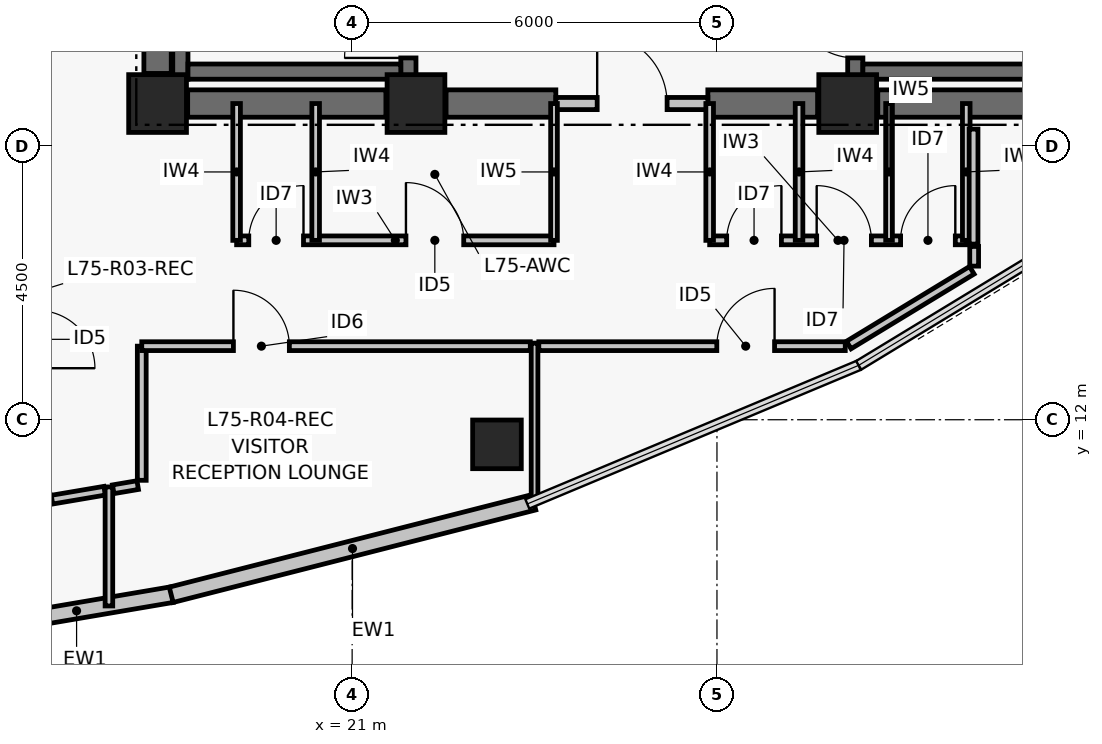
"""IFC4 building model, lengths in metres.
Left out: names, types, materials, properties, quantities, classifications, styles, units other than length and angle.
Written with IfcOpenShell. Run it as: python <this file> out.ifc"""

import sys

from ifc_helpers import new_model, si_unit, direction, frame, frame_2d, origin, origin_2d, place, context, subcontext, project, spatial, rectangle, hollow_rectangle, extrude, element, fill, save


model = new_model("IFC4")
c1 = context("Model", 3, precision=1e-05, world=origin(), true_north=direction((0.0, 1.0)))
c2 = subcontext(c1, "Body", "Model", "MODEL_VIEW")
j1 = project(units=[si_unit("LENGTHUNIT", "METRE"), si_unit("PLANEANGLEUNIT", "RADIAN")], contexts=[c1])
p1 = place(None, origin())
s1 = spatial("IfcSite", under=j1, at=p1, CompositionType="ELEMENT")
p2 = place(p1, origin())
s2 = spatial("IfcBuilding", under=s1, at=p2, CompositionType="ELEMENT")
p3 = place(p2, frame((0.0, 0.0, 295.5)))
s3 = spatial("IfcBuildingStorey", under=s2, at=p3, CompositionType="ELEMENT", Elevation=295.5)
for number, where, z_axis, x_axis in (
    (1, (17.8, 17.2, 0.0), (0.0, 0.0, 1.0), (1.0, 0.0, 0.0)),
    (2, (22.05, 17.2, 0.0), (0.0, 0.0, 1.0), (1.0, 0.0, 0.0)),
    (3, (29.15, 17.2, 0.0), (0.0, 0.0, 1.0), (1.0, 0.0, 0.0)),
):
    element("IfcColumn", number, at=place(p3, frame(where, z_axis=z_axis, x_axis=x_axis)), inside=s3, PredefinedType="COLUMN", context=c2, shape_type="SweptSolid", body=[
        extrude(rectangle(XDim=0.95, YDim=0.95, at=origin_2d()), origin(), (0.0, 0.0, 1.0), 3.72),
    ])
p4 = place(p3, frame((18.295, 17.2, 0.0), z_axis=(0.0, 0.0, 1.0), x_axis=(1.0, 0.0, 0.0)))
e4 = element("IfcWall", 4, at=p4, inside=s3, PredefinedType="SHEAR", context=c2, shape_type="SweptSolid", body=[
    extrude(rectangle(XDim=3.26, YDim=0.45, at=frame_2d((1.63, 0.0))), origin(), (0.0, 0.0, 1.0), 3.44),
])
p5 = place(p3, frame((22.545, 17.2, 0.0), z_axis=(0.0, 0.0, 1.0), x_axis=(1.0, 0.0, 0.0)))
e5 = element("IfcWall", 5, at=p5, inside=s3, PredefinedType="SHEAR", context=c2, shape_type="SweptSolid", body=[
    extrude(rectangle(XDim=1.805, YDim=0.45, at=frame_2d((0.903, 0.0))), origin(), (0.0, 0.0, 1.0), 3.44),
])
p6 = place(p3, frame((26.85, 17.2, 0.0), z_axis=(0.0, 0.0, 1.0), x_axis=(1.0, 0.0, 0.0)))
e6 = element("IfcWall", 6, at=p6, inside=s3, PredefinedType="SHEAR", context=c2, shape_type="SweptSolid", body=[
    extrude(rectangle(XDim=1.805, YDim=0.45, at=frame_2d((0.902, 0.0))), origin(), (0.0, 0.0, 1.0), 3.44),
])
p7 = place(p3, frame((29.645, 17.2, 0.0), z_axis=(0.0, 0.0, 1.0), x_axis=(1.0, 0.0, 0.0)))
e7 = element("IfcWall", 7, at=p7, inside=s3, PredefinedType="SHEAR", context=c2, shape_type="SweptSolid", body=[
    extrude(rectangle(XDim=3.26, YDim=0.45, at=frame_2d((1.63, 0.0))), origin(), (0.0, 0.0, 1.0), 3.44),
])
p8 = place(p3, frame((17.8, 17.695, 0.0), z_axis=(0.0, 0.0, 1.0), x_axis=(0.0, 1.0, 0.0)))
e8 = element("IfcWall", 8, at=p8, inside=s3, PredefinedType="SHEAR", context=c2, shape_type="SweptSolid", body=[
    extrude(rectangle(XDim=8.61, YDim=0.45, at=frame_2d((4.305, 0.0))), origin(), (0.0, 0.0, 1.0), 3.44),
])
p9 = place(p3, frame((18.175, 17.6, 0.0), z_axis=(0.0, 0.0, 1.0), x_axis=(0.0, 1.0, 0.0)))
e9 = element("IfcWall", 9, at=p9, inside=s3, PredefinedType="SHEAR", context=c2, shape_type="SweptSolid", body=[
    extrude(rectangle(XDim=8.8, YDim=0.25, at=frame_2d((4.4, 0.0))), origin(), (0.0, 0.0, 1.0), 3.44),
])
p10 = place(p3, frame((21.925, 17.6, 0.0), z_axis=(0.0, 0.0, 1.0), x_axis=(0.0, 1.0, 0.0)))
e10 = element("IfcWall", 10, at=p10, inside=s3, PredefinedType="SHEAR", context=c2, shape_type="SweptSolid", body=[
    extrude(rectangle(XDim=8.8, YDim=0.25, at=frame_2d((4.4, 0.0))), origin(), (0.0, 0.0, 1.0), 3.44),
])
p11 = place(p10, frame((0.35, 0.0, 0.0)))
e11 = element("IfcOpeningElement", 11, at=p11, cuts=e10, PredefinedType="OPENING", context=c2, shape_type="SweptSolid", body=[
    extrude(rectangle(XDim=1.05, YDim=2.08, at=frame_2d((0.525, 1.04))), frame((0.0, 0.135, 0.0), z_axis=(0.0, -1.0, 0.0), x_axis=(1.0, 0.0, 0.0)), (0.0, 0.0, 1.0), 0.27),
])
p12 = place(p3, frame((18.3, 17.725, 0.0), z_axis=(0.0, 0.0, 1.0), x_axis=(1.0, 0.0, 0.0)))
e12 = element("IfcWall", 12, at=p12, inside=s3, PredefinedType="SHEAR", context=c2, shape_type="SweptSolid", body=[
    extrude(rectangle(XDim=3.5, YDim=0.25, at=frame_2d((1.75, 0.0))), origin(), (0.0, 0.0, 1.0), 3.44),
])
p13 = place(p3, frame((29.275, 17.6, 0.0), z_axis=(0.0, 0.0, 1.0), x_axis=(0.0, 1.0, 0.0)))
e13 = element("IfcWall", 13, at=p13, inside=s3, PredefinedType="SHEAR", context=c2, shape_type="SweptSolid", body=[
    extrude(rectangle(XDim=8.8, YDim=0.25, at=frame_2d((4.4, 0.0))), origin(), (0.0, 0.0, 1.0), 3.44),
])
p14 = place(p13, frame((0.35, 0.0, 0.0)))
e14 = element("IfcOpeningElement", 14, at=p14, cuts=e13, PredefinedType="OPENING", context=c2, shape_type="SweptSolid", body=[
    extrude(rectangle(XDim=1.05, YDim=2.08, at=frame_2d((0.525, 1.04))), frame((0.0, 0.135, 0.0), z_axis=(0.0, -1.0, 0.0), x_axis=(1.0, 0.0, 0.0)), (0.0, 0.0, 1.0), 0.27),
])
p15 = place(p3, frame((29.4, 17.725, 0.0), z_axis=(0.0, 0.0, 1.0), x_axis=(1.0, 0.0, 0.0)))
e15 = element("IfcWall", 15, at=p15, inside=s3, PredefinedType="SHEAR", context=c2, shape_type="SweptSolid", body=[
    extrude(rectangle(XDim=3.5, YDim=0.25, at=frame_2d((1.75, 0.0))), origin(), (0.0, 0.0, 1.0), 3.44),
])
p16 = place(p3, frame((23.382, 11.595, 0.0), z_axis=(0.0, 0.0, 1.0), x_axis=(1.0, 0.0, 0.0)))
e16 = element("IfcColumn", 16, at=p16, inside=s3, PredefinedType="COLUMN", context=c2, shape_type="SweptSolid", body=[
    extrude(hollow_rectangle(XDim=0.8, YDim=0.8, WallThickness=0.035, at=origin_2d()), origin(), (0.0, 0.0, 1.0), 3.72),
])
p17 = place(p3, frame((18.036, 9.124, 0.0), z_axis=(0.0, 0.0, 1.0), x_axis=(-0.985889432766, -0.167397808709, 0.0)))
e17 = element("IfcWall", 17, at=p17, inside=s3, PredefinedType="PARTITIONING", context=c2, shape_type="SweptSolid", body=[
    extrude(rectangle(XDim=3.181, YDim=0.26, at=frame_2d((1.59, 0.0))), origin(), (0.0, 0.0, 1.0), 3.44),
])
p18 = place(p3, frame((23.988, 10.642, 0.0), z_axis=(0.0, 0.0, 1.0), x_axis=(-0.968988278672, -0.247106689096, 0.0)))
e18 = element("IfcWall", 18, at=p18, inside=s3, PredefinedType="PARTITIONING", context=c2, shape_type="SweptSolid", body=[
    extrude(rectangle(XDim=6.154, YDim=0.26, at=frame_2d((3.077, 0.0))), origin(), (0.0, 0.0, 1.0), 3.44),
])
p19 = place(p3, frame((24.35, 17.2, 0.0), z_axis=(0.0, 0.0, 1.0), x_axis=(1.0, 0.0, 0.0)))
e19 = element("IfcWall", 19, at=p19, inside=s3, PredefinedType="PARTITIONING", context=c2, shape_type="SweptSolid", body=[
    extrude(rectangle(XDim=2.5, YDim=0.2, at=frame_2d((1.25, 0.0))), origin(), (0.0, 0.0, 1.0), 2.57),
])
p20 = place(p19, frame((0.68, 0.0, 0.0)))
e20 = element("IfcOpeningElement", 20, at=p20, cuts=e19, PredefinedType="OPENING", context=c2, shape_type="SweptSolid", body=[
    extrude(rectangle(XDim=1.15, YDim=2.08, at=frame_2d((0.575, 1.04))), frame((0.0, 0.11, 0.0), z_axis=(0.0, -1.0, 0.0), x_axis=(1.0, 0.0, 0.0)), (0.0, 0.0, 1.0), 0.22),
])
p21 = place(p3, frame((19.1, 14.95, 0.0), z_axis=(0.0, 0.0, 1.0), x_axis=(1.0, 0.0, 0.0)))
e21 = element("IfcWall", 21, at=p21, inside=s3, PredefinedType="PARTITIONING", context=c2, shape_type="SweptSolid", body=[
    extrude(rectangle(XDim=5.22, YDim=0.145, at=frame_2d((2.61, 0.0))), origin(), (0.0, 0.0, 1.0), 2.17),
])
p22 = place(p21, frame((0.2, 0.0, 0.0)))
e22 = element("IfcOpeningElement", 22, at=p22, cuts=e21, PredefinedType="OPENING", context=c2, shape_type="SweptSolid", body=[
    extrude(rectangle(XDim=0.9, YDim=2.02, at=frame_2d((0.45, 1.01))), frame((0.0, 0.083, 0.0), z_axis=(0.0, -1.0, 0.0), x_axis=(1.0, 0.0, 0.0)), (0.0, 0.0, 1.0), 0.165),
])
p23 = place(p21, frame((2.785, 0.0, 0.0)))
e23 = element("IfcOpeningElement", 23, at=p23, cuts=e21, PredefinedType="OPENING", context=c2, shape_type="SweptSolid", body=[
    extrude(rectangle(XDim=0.95, YDim=2.06, at=frame_2d((0.475, 1.03))), frame((0.0, 0.083, 0.0), z_axis=(0.0, -1.0, 0.0), x_axis=(1.0, 0.0, 0.0)), (0.0, 0.0, 1.0), 0.165),
])
p24 = place(p3, frame((26.88, 14.95, 0.0), z_axis=(0.0, 0.0, 1.0), x_axis=(1.0, 0.0, 0.0)))
e24 = element("IfcWall", 24, at=p24, inside=s3, PredefinedType="PARTITIONING", context=c2, shape_type="SweptSolid", body=[
    extrude(rectangle(XDim=4.22, YDim=0.145, at=frame_2d((2.11, 0.0))), origin(), (0.0, 0.0, 1.0), 2.92),
])
p25 = place(p24, frame((0.28, 0.0, 0.0)))
e25 = element("IfcOpeningElement", 25, at=p25, cuts=e24, PredefinedType="OPENING", context=c2, shape_type="SweptSolid", body=[
    extrude(rectangle(XDim=0.9, YDim=2.02, at=frame_2d((0.45, 1.01))), frame((0.0, 0.083, 0.0), z_axis=(0.0, -1.0, 0.0), x_axis=(1.0, 0.0, 0.0)), (0.0, 0.0, 1.0), 0.165),
])
p26 = place(p24, frame((1.76, 0.0, 0.0)))
e26 = element("IfcOpeningElement", 26, at=p26, cuts=e24, PredefinedType="OPENING", context=c2, shape_type="SweptSolid", body=[
    extrude(rectangle(XDim=0.9, YDim=2.02, at=frame_2d((0.45, 1.01))), frame((0.0, 0.083, 0.0), z_axis=(0.0, -1.0, 0.0), x_axis=(1.0, 0.0, 0.0)), (0.0, 0.0, 1.0), 0.165),
])
p27 = place(p24, frame((3.14, 0.0, 0.0)))
e27 = element("IfcOpeningElement", 27, at=p27, cuts=e24, PredefinedType="OPENING", context=c2, shape_type="SweptSolid", body=[
    extrude(rectangle(XDim=0.9, YDim=2.02, at=frame_2d((0.45, 1.01))), frame((0.0, 0.083, 0.0), z_axis=(0.0, -1.0, 0.0), x_axis=(1.0, 0.0, 0.0)), (0.0, 0.0, 1.0), 0.165),
])
for number, where, z_axis, x_axis in (
    (28, (19.1, 14.95, 0.0), (0.0, 0.0, 1.0), (0.0, 1.0, 0.0)),
    (29, (20.4, 14.95, 0.0), (0.0, 0.0, 1.0), (0.0, 1.0, 0.0)),
):
    element("IfcWall", number, at=place(p3, frame(where, z_axis=z_axis, x_axis=x_axis)), inside=s3, PredefinedType="PARTITIONING", context=c2, shape_type="SweptSolid", body=[
        extrude(rectangle(XDim=2.25, YDim=0.125, at=frame_2d((1.125, 0.0))), origin(), (0.0, 0.0, 1.0), 2.57),
    ])
p28 = place(p3, frame((24.32, 14.95, 0.0), z_axis=(0.0, 0.0, 1.0), x_axis=(0.0, 1.0, 0.0)))
e30 = element("IfcWall", 30, at=p28, inside=s3, PredefinedType="PARTITIONING", context=c2, shape_type="SweptSolid", body=[
    extrude(rectangle(XDim=2.25, YDim=0.11, at=frame_2d((1.125, 0.0))), origin(), (0.0, 0.0, 1.0), 2.57),
])
for number, where, z_axis, x_axis in (
    (31, (26.88, 14.95, 0.0), (0.0, 0.0, 1.0), (0.0, 1.0, 0.0)),
    (32, (28.35, 14.95, 0.0), (0.0, 0.0, 1.0), (0.0, 1.0, 0.0)),
):
    element("IfcWall", number, at=place(p3, frame(where, z_axis=z_axis, x_axis=x_axis)), inside=s3, PredefinedType="PARTITIONING", context=c2, shape_type="SweptSolid", body=[
        extrude(rectangle(XDim=2.25, YDim=0.125, at=frame_2d((1.125, 0.0))), origin(), (0.0, 0.0, 1.0), 2.57),
    ])
p29 = place(p3, frame((29.83, 14.95, 0.0), z_axis=(0.0, 0.0, 1.0), x_axis=(0.0, 1.0, 0.0)))
e33 = element("IfcWall", 33, at=p29, inside=s3, PredefinedType="PARTITIONING", context=c2, shape_type="SweptSolid", body=[
    extrude(rectangle(XDim=2.25, YDim=0.11, at=frame_2d((1.125, 0.0))), origin(), (0.0, 0.0, 1.0), 2.57),
])
p30 = place(p3, frame((31.1, 14.95, 0.0), z_axis=(0.0, 0.0, 1.0), x_axis=(0.0, 1.0, 0.0)))
e34 = element("IfcWall", 34, at=p30, inside=s3, PredefinedType="PARTITIONING", context=c2, shape_type="SweptSolid", body=[
    extrude(rectangle(XDim=2.25, YDim=0.125, at=frame_2d((1.125, 0.0))), origin(), (0.0, 0.0, 1.0), 2.57),
])
p31 = place(p3, frame((16.063, 10.686, 0.0), z_axis=(0.0, 0.0, 1.0), x_axis=(0.985878779942, 0.167460536424, 0.0)))
e35 = element("IfcWall", 35, at=p31, inside=s3, PredefinedType="PARTITIONING", context=c2, shape_type="SweptSolid", body=[
    extrude(rectangle(XDim=0.879, YDim=0.145, at=frame_2d((0.439, 0.0))), origin(), (0.0, 0.0, 1.0), 2.17),
])
p32 = place(p3, frame((17.07, 10.856, 0.0), z_axis=(0.0, 0.0, 1.0), x_axis=(0.985840066474, 0.167688292179, 0.0)))
e36 = element("IfcWall", 36, at=p32, inside=s3, PredefinedType="PARTITIONING", context=c2, shape_type="SweptSolid", body=[
    extrude(rectangle(XDim=0.409, YDim=0.145, at=frame_2d((0.205, 0.0))), origin(), (0.0, 0.0, 1.0), 3.44),
])
p33 = place(p3, frame((17.54, 11.004, 0.0), z_axis=(0.0, 0.0, 1.0), x_axis=(0.0, 1.0, 0.0)))
e37 = element("IfcWall", 37, at=p33, inside=s3, PredefinedType="PARTITIONING", context=c2, shape_type="SweptSolid", body=[
    extrude(rectangle(XDim=2.206, YDim=0.145, at=frame_2d((1.103, 0.0))), origin(), (0.0, 0.0, 1.0), 3.44),
])
p34 = place(p3, frame((17.54, 13.21, 0.0), z_axis=(0.0, 0.0, 1.0), x_axis=(1.0, 0.0, 0.0)))
e38 = element("IfcWall", 38, at=p34, inside=s3, PredefinedType="PARTITIONING", context=c2, shape_type="SweptSolid", body=[
    extrude(rectangle(XDim=6.39, YDim=0.145, at=frame_2d((3.195, 0.0))), origin(), (0.0, 0.0, 1.0), 2.17),
])
p35 = place(p34, frame((1.508, 0.0, 0.0)))
e39 = element("IfcOpeningElement", 39, at=p35, cuts=e38, PredefinedType="OPENING", context=c2, shape_type="SweptSolid", body=[
    extrude(rectangle(XDim=0.92, YDim=2.05, at=frame_2d((0.46, 1.025))), frame((0.0, 0.083, 0.0), z_axis=(0.0, -1.0, 0.0), x_axis=(1.0, 0.0, 0.0)), (0.0, 0.0, 1.0), 0.165),
])
p36 = place(p3, frame((24.07, 13.21, 0.0), z_axis=(0.0, 0.0, 1.0), x_axis=(1.0, 0.0, 0.0)))
e40 = element("IfcWall", 40, at=p36, inside=s3, PredefinedType="PARTITIONING", context=c2, shape_type="SweptSolid", body=[
    extrude(rectangle(XDim=5.04, YDim=0.145, at=frame_2d((2.52, 0.0))), origin(), (0.0, 0.0, 1.0), 2.92),
])
p37 = place(p36, frame((2.927, 0.0, 0.0)))
e41 = element("IfcOpeningElement", 41, at=p37, cuts=e40, PredefinedType="OPENING", context=c2, shape_type="SweptSolid", body=[
    extrude(rectangle(XDim=0.95, YDim=2.06, at=frame_2d((0.475, 1.03))), frame((0.0, 0.083, 0.0), z_axis=(0.0, -1.0, 0.0), x_axis=(1.0, 0.0, 0.0)), (0.0, 0.0, 1.0), 0.165),
])
p38 = place(p3, frame((29.168, 13.229, 0.0), z_axis=(0.0, 0.0, 1.0), x_axis=(0.854678044033, 0.519158396876, 0.0)))
e42 = element("IfcWall", 42, at=p38, inside=s3, PredefinedType="PARTITIONING", context=c2, shape_type="SweptSolid", body=[
    extrude(rectangle(XDim=2.368, YDim=0.145, at=frame_2d((1.184, 0.0))), origin(), (0.0, 0.0, 1.0), 3.44),
])
p39 = place(p3, frame((31.23, 14.526, 0.0), z_axis=(0.0, 0.0, 1.0), x_axis=(0.0, 1.0, 0.0)))
e43 = element("IfcWall", 43, at=p39, inside=s3, PredefinedType="PARTITIONING", context=c2, shape_type="SweptSolid", body=[
    extrude(rectangle(XDim=0.324, YDim=0.145, at=frame_2d((0.162, 0.0))), origin(), (0.0, 0.0, 1.0), 3.44),
])
p40 = place(p3, frame((31.22, 14.889, 0.0), z_axis=(0.0, 0.0, 1.0), x_axis=(0.0, 1.0, 0.0)))
e44 = element("IfcWall", 44, at=p40, inside=s3, PredefinedType="PARTITIONING", context=c2, shape_type="SweptSolid", body=[
    extrude(rectangle(XDim=1.891, YDim=0.145, at=frame_2d((0.946, 0.0))), origin(), (0.0, 0.0, 1.0), 2.57),
])
p41 = place(p3, frame((17.0, 8.938, 0.0), z_axis=(0.0, 0.0, 1.0), x_axis=(0.0, 1.0, 0.0)))
e45 = element("IfcWall", 45, at=p41, inside=s3, PredefinedType="PARTITIONING", context=c2, shape_type="SweptSolid", body=[
    extrude(rectangle(XDim=1.958, YDim=0.125, at=frame_2d((0.979, 0.0))), origin(), (0.0, 0.0, 1.0), 2.92),
])
p42 = place(p3, frame((24.0, 10.654, 0.0), z_axis=(0.0, 0.0, 1.0), x_axis=(0.0, 1.0, 0.0)))
e46 = element("IfcWall", 46, at=p42, inside=s3, PredefinedType="PARTITIONING", context=c2, shape_type="SweptSolid", body=[
    extrude(rectangle(XDim=2.606, YDim=0.11, at=frame_2d((1.303, 0.0))), origin(), (0.0, 0.0, 1.0), 2.92),
])
p43 = place(p11, origin())
e47 = element("IfcDoor", 47, at=p43, inside=s3, OperationType="SINGLE_SWING_LEFT", PredefinedType="DOOR", context=c2, shape_type="SweptSolid", body=[
    extrude(rectangle(XDim=1.05, YDim=2.08, at=frame_2d((0.525, 1.04))), frame((0.0, 0.025, 0.0), z_axis=(0.0, -1.0, 0.0), x_axis=(1.0, 0.0, 0.0)), (0.0, 0.0, 1.0), 0.05),
])
fill(e11, e47)
p44 = place(p14, origin())
e48 = element("IfcDoor", 48, at=p44, inside=s3, OperationType="SINGLE_SWING_RIGHT", PredefinedType="DOOR", context=c2, shape_type="SweptSolid", body=[
    extrude(rectangle(XDim=1.05, YDim=2.08, at=frame_2d((0.525, 1.04))), frame((0.0, 0.025, 0.0), z_axis=(0.0, -1.0, 0.0), x_axis=(1.0, 0.0, 0.0)), (0.0, 0.0, 1.0), 0.05),
])
fill(e14, e48)
p45 = place(p20, origin())
e49 = element("IfcDoor", 49, at=p45, inside=s3, OperationType="SINGLE_SWING_LEFT", PredefinedType="DOOR", context=c2, shape_type="SweptSolid", body=[
    extrude(rectangle(XDim=1.15, YDim=2.08, at=frame_2d((0.575, 1.04))), frame((0.0, 0.025, 0.0), z_axis=(0.0, -1.0, 0.0), x_axis=(1.0, 0.0, 0.0)), (0.0, 0.0, 1.0), 0.05),
])
fill(e20, e49)
p46 = place(p22, origin())
e50 = element("IfcDoor", 50, at=p46, inside=s3, OperationType="SINGLE_SWING_RIGHT", PredefinedType="DOOR", context=c2, shape_type="SweptSolid", body=[
    extrude(rectangle(XDim=0.9, YDim=2.02, at=frame_2d((0.45, 1.01))), frame((0.0, 0.025, 0.0), z_axis=(0.0, -1.0, 0.0), x_axis=(1.0, 0.0, 0.0)), (0.0, 0.0, 1.0), 0.05),
])
fill(e22, e50)
p47 = place(p23, origin())
e51 = element("IfcDoor", 51, at=p47, inside=s3, OperationType="SINGLE_SWING_LEFT", PredefinedType="DOOR", context=c2, shape_type="SweptSolid", body=[
    extrude(rectangle(XDim=0.95, YDim=2.06, at=frame_2d((0.475, 1.03))), frame((0.0, 0.025, 0.0), z_axis=(0.0, -1.0, 0.0), x_axis=(1.0, 0.0, 0.0)), (0.0, 0.0, 1.0), 0.05),
])
fill(e23, e51)
p48 = place(p25, origin())
e52 = element("IfcDoor", 52, at=p48, inside=s3, OperationType="SINGLE_SWING_RIGHT", PredefinedType="DOOR", context=c2, shape_type="SweptSolid", body=[
    extrude(rectangle(XDim=0.9, YDim=2.02, at=frame_2d((0.45, 1.01))), frame((0.0, 0.025, 0.0), z_axis=(0.0, -1.0, 0.0), x_axis=(1.0, 0.0, 0.0)), (0.0, 0.0, 1.0), 0.05),
])
fill(e25, e52)
p49 = place(p26, origin())
e53 = element("IfcDoor", 53, at=p49, inside=s3, OperationType="SINGLE_SWING_LEFT", PredefinedType="DOOR", context=c2, shape_type="SweptSolid", body=[
    extrude(rectangle(XDim=0.9, YDim=2.02, at=frame_2d((0.45, 1.01))), frame((0.0, 0.025, 0.0), z_axis=(0.0, -1.0, 0.0), x_axis=(1.0, 0.0, 0.0)), (0.0, 0.0, 1.0), 0.05),
])
fill(e26, e53)
p50 = place(p27, origin())
e54 = element("IfcDoor", 54, at=p50, inside=s3, OperationType="SINGLE_SWING_RIGHT", PredefinedType="DOOR", context=c2, shape_type="SweptSolid", body=[
    extrude(rectangle(XDim=0.9, YDim=2.02, at=frame_2d((0.45, 1.01))), frame((0.0, 0.025, 0.0), z_axis=(0.0, -1.0, 0.0), x_axis=(1.0, 0.0, 0.0)), (0.0, 0.0, 1.0), 0.05),
])
fill(e27, e54)
p51 = place(p35, origin())
e55 = element("IfcDoor", 55, at=p51, inside=s3, OperationType="SINGLE_SWING_LEFT", PredefinedType="DOOR", context=c2, shape_type="SweptSolid", body=[
    extrude(rectangle(XDim=0.92, YDim=2.05, at=frame_2d((0.46, 1.025))), frame((0.0, 0.025, 0.0), z_axis=(0.0, -1.0, 0.0), x_axis=(1.0, 0.0, 0.0)), (0.0, 0.0, 1.0), 0.05),
])
fill(e39, e55)
p52 = place(p37, origin())
e56 = element("IfcDoor", 56, at=p52, inside=s3, OperationType="SINGLE_SWING_RIGHT", PredefinedType="DOOR", context=c2, shape_type="SweptSolid", body=[
    extrude(rectangle(XDim=0.95, YDim=2.06, at=frame_2d((0.475, 1.03))), frame((0.0, 0.025, 0.0), z_axis=(0.0, -1.0, 0.0), x_axis=(1.0, 0.0, 0.0)), (0.0, 0.0, 1.0), 0.05),
])
fill(e41, e56)
save(model, sys.argv[1])
